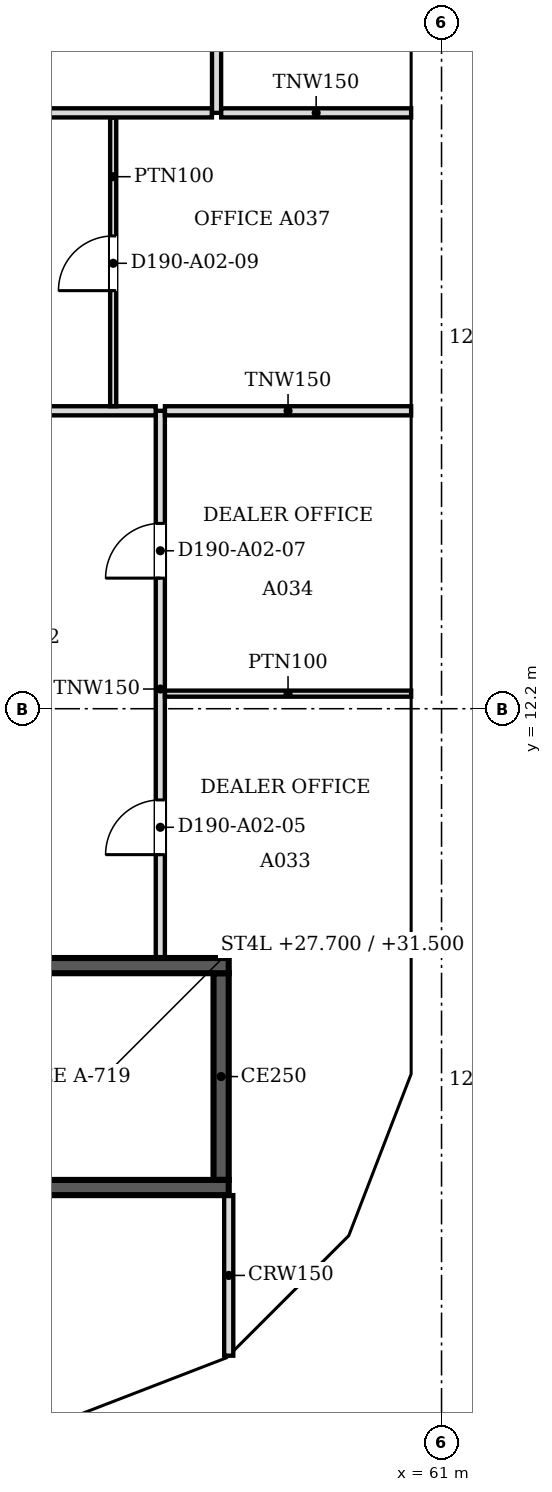
"""IFC4 building model, lengths in metres.
Left out: names, types, materials, properties, quantities, classifications, styles, units other than length and angle.
Written with IfcOpenShell. Run it as: python <this file> out.ifc"""

import sys

from ifc_helpers import new_model, si_unit, direction, frame, frame_2d, origin, place, context, subcontext, project, spatial, polyline, rectangle, outline, extrude, faceted_brep, source, transform, mapped, element, fill, save


model = new_model("IFC4")
c1 = context("Model", 3, precision=1e-05, world=origin(), true_north=direction((0.0, 1.0)))
c2 = subcontext(c1, "Body", "Model", "MODEL_VIEW")
j1 = project(units=[si_unit("LENGTHUNIT", "METRE"), si_unit("PLANEANGLEUNIT", "RADIAN")], contexts=[c1])
p1 = place(None, origin())
s1 = spatial("IfcSite", under=j1, at=p1, CompositionType="ELEMENT")
p2 = place(p1, origin())
s2 = spatial("IfcBuilding", under=s1, at=p2, CompositionType="ELEMENT")
p3 = place(p2, frame((0.0, 0.0, 25.8)))
s3 = spatial("IfcBuildingStorey", under=s2, at=p3, CompositionType="ELEMENT", Elevation=25.8)
m1 = source(origin(), c2, "Body", "Brep", [
    faceted_brep([(2.997, -0.25, 0.0), (0.047, -0.25, 3.8), (0.0, -0.25, 3.741), (0.0, -0.25, 0.0), (0.093, 0.25, 3.74), (2.944, 0.25, 0.068), (2.944, 0.25, 0.0), (0.093, 0.25, 0.0), (0.047, 0.0, 3.8), (2.997, 0.0, 0.0)], [[[0, 1, 2, 3]], [[4, 5, 6, 7]], [[5, 4, 8, 1, 0, 9]], [[2, 1, 8]], [[7, 6, 9, 0, 3]], [[7, 3, 2, 8, 4]], [[9, 6, 5]]]),
])
p4 = place(p3, frame((54.81, 0.233, 0.0), z_axis=(0.0, 0.0, 1.0), x_axis=(0.932990326376, 0.359901446078, 0.0)))
e1 = element("IfcWall", 1, at=p4, inside=s3, PredefinedType="SOLIDWALL", context=c2, shape_type="MappedRepresentation", body=[
    mapped(m1, transform((0.0, 0.0, 0.0), scale=1.0)),
])
m2 = source(origin(), c2, "Body", "SweptSolid", [
    extrude(outline(polyline([(2.487, 0.25), (0.247, 3.135), (0.247, 0.25), (2.487, 0.25)])), frame((0.0, 0.26, 0.0), z_axis=(0.0, -1.0, 0.0), x_axis=(1.0, 0.0, 0.0)), (0.0, 0.0, 1.0), 0.52),
])
p5 = place(p4, origin())
e2 = element("IfcOpeningElement", 2, at=p5, cuts=e1, PredefinedType="OPENING", context=c2, shape_type="MappedRepresentation", body=[
    mapped(m2, transform((0.0, 0.0, 0.0), scale=1.0)),
])
m3 = source(origin(), c2, "Body", "Brep", [
    faceted_brep([(2.997, -0.25, 3.732), (2.944, -0.25, 3.8), (0.0, -0.25, 0.0), (2.997, -0.25, 0.0), (0.053, 0.25, 0.068), (2.891, 0.25, 3.732), (2.891, 0.25, 0.0), (0.053, 0.25, 0.0), (2.944, 0.0, 3.8), (0.0, 0.0, 0.0)], [[[0, 1, 2, 3]], [[4, 5, 6, 7]], [[8, 1, 0]], [[5, 4, 9, 2, 1, 8]], [[7, 6, 3, 2, 9]], [[7, 9, 4]], [[3, 6, 5, 8, 0]]]),
])
p6 = place(p3, frame((57.606, 1.312, 0.0), z_axis=(0.0, 0.0, 1.0), x_axis=(0.707147509625, 0.707066050402, 0.0)))
e3 = element("IfcWall", 3, at=p6, inside=s3, PredefinedType="SOLIDWALL", context=c2, shape_type="MappedRepresentation", body=[
    mapped(m3, transform((0.0, 0.0, 0.0), scale=1.0)),
])
m4 = source(origin(), c2, "Body", "SweptSolid", [
    extrude(outline(polyline([(2.744, 3.134), (0.51, 0.25), (2.744, 0.25), (2.744, 3.134)])), frame((0.0, 0.26, 0.0), z_axis=(0.0, -1.0, 0.0), x_axis=(1.0, 0.0, 0.0)), (0.0, 0.0, 1.0), 0.52),
])
p7 = place(p6, origin())
e4 = element("IfcOpeningElement", 4, at=p7, cuts=e3, PredefinedType="OPENING", context=c2, shape_type="MappedRepresentation", body=[
    mapped(m4, transform((0.0, 0.0, 0.0), scale=1.0)),
])
m5 = source(origin(), c2, "Body", "Brep", [
    faceted_brep([(3.003, -0.25, 0.0), (0.053, -0.25, 3.8), (0.0, -0.25, 3.732), (0.0, -0.25, 0.0), (0.106, 0.25, 3.732), (2.957, 0.25, 0.06), (2.957, 0.25, 0.0), (0.106, 0.25, 0.0), (0.053, 0.0, 3.8), (3.003, 0.0, 0.0)], [[[0, 1, 2, 3]], [[4, 5, 6, 7]], [[5, 4, 8, 1, 0, 9]], [[2, 1, 8]], [[7, 6, 9, 0, 3]], [[7, 3, 2, 8, 4]], [[9, 6, 5]]]),
])
p8 = place(p3, frame((59.669, 3.344, 0.0), z_axis=(0.0, 0.0, 1.0), x_axis=(0.35992665181, 0.932980602862, 0.0)))
e5 = element("IfcWall", 5, at=p8, inside=s3, PredefinedType="SOLIDWALL", context=c2, shape_type="MappedRepresentation", body=[
    mapped(m5, transform((0.0, 0.0, 0.0), scale=1.0)),
])
m6 = source(origin(), c2, "Body", "SweptSolid", [
    extrude(outline(polyline([(2.493, 0.25), (0.253, 3.135), (0.253, 0.25), (2.493, 0.25)])), frame((0.0, 0.26, 0.0), z_axis=(0.0, -1.0, 0.0), x_axis=(1.0, 0.0, 0.0)), (0.0, 0.0, 1.0), 0.52),
])
p9 = place(p8, origin())
e6 = element("IfcOpeningElement", 6, at=p9, cuts=e5, PredefinedType="OPENING", context=c2, shape_type="MappedRepresentation", body=[
    mapped(m6, transform((0.0, 0.0, 0.0), scale=1.0)),
])
m7 = source(origin(), c2, "Body", "Brep", [
    faceted_brep([(6.053, -0.25, 0.0), (3.003, -0.25, 3.8), (0.0, -0.25, 0.0), (0.047, 0.25, 0.059), (3.003, 0.25, 3.8), (6.053, 0.25, 0.0), (0.047, 0.25, 0.0), (0.0, 0.0, 0.0)], [[[0, 1, 2]], [[3, 4, 5, 6]], [[5, 4, 1, 0]], [[4, 3, 7, 2, 1]], [[6, 5, 0, 2, 7]], [[6, 7, 3]]]),
])
p10 = place(p3, frame((60.75, 6.146, 0.0), z_axis=(0.0, 0.0, 1.0), x_axis=(0.0, 1.0, 0.0)))
e7 = element("IfcWall", 7, at=p10, inside=s3, PredefinedType="SOLIDWALL", context=c2, shape_type="MappedRepresentation", body=[
    mapped(m7, transform((0.0, 0.0, 0.0), scale=1.0)),
])
m8 = source(origin(), c2, "Body", "SweptSolid", [
    extrude(outline(polyline([(5.532, 0.25), (3.005, 3.399), (0.516, 0.25), (5.532, 0.25)])), frame((0.0, 0.26, 0.0), z_axis=(0.0, -1.0, 0.0), x_axis=(1.0, 0.0, 0.0)), (0.0, 0.0, 1.0), 0.52),
])
p11 = place(p10, origin())
e8 = element("IfcOpeningElement", 8, at=p11, cuts=e7, PredefinedType="OPENING", context=c2, shape_type="MappedRepresentation", body=[
    mapped(m8, transform((0.0, 0.0, 0.0), scale=1.0)),
])
m9 = source(origin(), c2, "Body", "SweptSolid", [
    extrude(outline(polyline([(6.1, 0.0), (3.05, 3.8), (0.0, 0.0), (6.1, 0.0)])), frame((0.0, 0.25, 0.0), z_axis=(0.0, -1.0, 0.0), x_axis=(1.0, 0.0, 0.0)), (0.0, 0.0, 1.0), 0.5),
])
p12 = place(p3, frame((60.75, 12.2, 0.0), z_axis=(0.0, 0.0, 1.0), x_axis=(0.0, 1.0, 0.0)))
e9 = element("IfcWall", 9, at=p12, inside=s3, PredefinedType="SOLIDWALL", context=c2, shape_type="MappedRepresentation", body=[
    mapped(m9, transform((0.0, 0.0, 0.0), scale=1.0)),
])
m10 = source(origin(), c2, "Body", "SweptSolid", [
    extrude(outline(polyline([(5.579, 0.25), (3.05, 3.401), (0.521, 0.25), (5.579, 0.25)])), frame((0.0, 0.26, 0.0), z_axis=(0.0, -1.0, 0.0), x_axis=(1.0, 0.0, 0.0)), (0.0, 0.0, 1.0), 0.52),
])
p13 = place(p12, origin())
e10 = element("IfcOpeningElement", 10, at=p13, cuts=e9, PredefinedType="OPENING", context=c2, shape_type="MappedRepresentation", body=[
    mapped(m10, transform((0.0, 0.0, 0.0), scale=1.0)),
])
m11 = source(origin(), c2, "Body", "Brep", [
    faceted_brep([(6.1, -0.25, 0.0), (3.05, -0.25, 3.8), (0.0, -0.25, 0.0), (6.1, -0.25, 0.0), (0.0, 0.25, 0.0), (3.05, 0.25, 3.8), (6.1, 0.25, 0.0), (6.1, 0.25, 0.0)], [[[0, 1, 2, 3]], [[4, 5, 6, 7]], [[6, 5, 1, 0]], [[5, 4, 2, 1]], [[4, 7, 3, 2]], [[3, 7, 6, 0]]]),
])
p14 = place(p3, frame((60.75, 18.3, 0.0), z_axis=(0.0, 0.0, 1.0), x_axis=(0.0, 1.0, 0.0)))
e11 = element("IfcWall", 11, at=p14, inside=s3, PredefinedType="SOLIDWALL", context=c2, shape_type="MappedRepresentation", body=[
    mapped(m11, transform((0.0, 0.0, 0.0), scale=1.0)),
])
p15 = place(p14, origin())
e12 = element("IfcOpeningElement", 12, at=p15, cuts=e11, PredefinedType="OPENING", context=c2, shape_type="MappedRepresentation", body=[
    mapped(m10, transform((0.0, 0.0, 0.0), scale=1.0)),
])
p16 = place(p2, frame((0.0, 0.0, 29.6)))
s4 = spatial("IfcBuildingStorey", under=s2, at=p16, CompositionType="ELEMENT", Elevation=29.6)
m12 = source(origin(), c2, "Body", "Brep", [
    faceted_brep([(2.95, -0.25, 0.0), (3.003, -0.25, 0.068), (3.003, -0.25, 7.531), (2.95, -0.25, 7.6), (0.0, -0.25, 3.8), (0.047, 0.25, 3.86), (2.898, 0.25, 7.532), (2.898, 0.25, 0.068), (0.047, 0.25, 3.74), (2.95, 0.0, 0.0), (2.95, 0.0, 7.6), (0.0, 0.0, 3.8)], [[[0, 1, 2, 3, 4]], [[5, 6, 7, 8]], [[1, 0, 9]], [[10, 3, 2]], [[6, 5, 11, 4, 3, 10]], [[8, 7, 9, 0, 4, 11]], [[8, 11, 5]], [[1, 9, 7, 6, 10, 2]]]),
])
p17 = place(p16, frame((54.854, 0.25, -3.8), z_axis=(0.0, 0.0, 1.0), x_axis=(0.932970071518, 0.359953949349, 0.0)))
e13 = element("IfcWall", 13, at=p17, inside=s4, PredefinedType="SOLIDWALL", context=c2, shape_type="MappedRepresentation", body=[
    mapped(m12, transform((0.0, 0.0, 0.0), scale=1.0)),
])
m13 = source(origin(), c2, "Body", "SweptSolid", [
    extrude(outline(polyline([(2.75, 6.935), (0.316, 3.8), (2.75, 0.665), (2.75, 6.935)])), frame((0.0, 0.26, 0.0), z_axis=(0.0, -1.0, 0.0), x_axis=(1.0, 0.0, 0.0)), (0.0, 0.0, 1.0), 0.52),
])
p18 = place(p17, origin())
e14 = element("IfcOpeningElement", 14, at=p18, cuts=e13, PredefinedType="OPENING", context=c2, shape_type="MappedRepresentation", body=[
    mapped(m13, transform((0.0, 0.0, 0.0), scale=1.0)),
])
m14 = source(origin(), c2, "Body", "Brep", [
    faceted_brep([(0.053, -0.25, 0.0), (2.997, -0.25, 3.8), (0.053, -0.25, 7.6), (0.0, -0.25, 7.532), (0.0, -0.25, 0.068), (0.106, 0.25, 7.531), (2.944, 0.25, 3.868), (2.944, 0.25, 3.732), (0.106, 0.25, 0.068), (2.997, 0.0, 3.8), (0.053, 0.0, 0.0), (0.053, 0.0, 7.6)], [[[0, 1, 2, 3, 4]], [[5, 6, 7, 8]], [[8, 7, 9, 1, 0, 10]], [[6, 5, 11, 2, 1, 9]], [[3, 2, 11]], [[10, 0, 4]], [[8, 10, 4, 3, 11, 5]], [[7, 6, 9]]]),
])
p19 = place(p16, frame((57.569, 1.274, -3.8), z_axis=(0.0, 0.0, 1.0), x_axis=(0.707066050402, 0.707147509625, 0.0)))
e15 = element("IfcWall", 15, at=p19, inside=s4, PredefinedType="SOLIDWALL", context=c2, shape_type="MappedRepresentation", body=[
    mapped(m14, transform((0.0, 0.0, 0.0), scale=1.0)),
])
m15 = source(origin(), c2, "Body", "SweptSolid", [
    extrude(outline(polyline([(0.253, 0.666), (2.681, 3.8), (0.253, 6.934), (0.253, 0.666)])), frame((0.0, 0.26, 0.0), z_axis=(0.0, -1.0, 0.0), x_axis=(1.0, 0.0, 0.0)), (0.0, 0.0, 1.0), 0.52),
])
p20 = place(p19, origin())
e16 = element("IfcOpeningElement", 16, at=p20, cuts=e15, PredefinedType="OPENING", context=c2, shape_type="MappedRepresentation", body=[
    mapped(m15, transform((0.0, 0.0, 0.0), scale=1.0)),
])
m16 = source(origin(), c2, "Body", "Brep", [
    faceted_brep([(2.95, -0.25, 0.0), (2.997, -0.25, 0.059), (2.997, -0.25, 7.541), (2.95, -0.25, 7.6), (0.0, -0.25, 3.8), (0.053, 0.25, 3.868), (2.904, 0.25, 7.54), (2.904, 0.25, 0.06), (0.053, 0.25, 3.732), (2.95, 0.0, 0.0), (2.95, 0.0, 7.6), (0.0, 0.0, 3.8)], [[[0, 1, 2, 3, 4]], [[5, 6, 7, 8]], [[1, 0, 9]], [[10, 3, 2]], [[6, 5, 11, 4, 3, 10]], [[8, 7, 9, 0, 4, 11]], [[8, 11, 5]], [[1, 9, 7, 6, 10, 2]]]),
])
p21 = place(p16, frame((59.688, 3.394, -3.8), z_axis=(0.0, 0.0, 1.0), x_axis=(0.359972353723, 0.932962970624, 0.0)))
e17 = element("IfcWall", 17, at=p21, inside=s4, PredefinedType="SOLIDWALL", context=c2, shape_type="MappedRepresentation", body=[
    mapped(m16, transform((0.0, 0.0, 0.0), scale=1.0)),
])
p22 = place(p21, origin())
e18 = element("IfcOpeningElement", 18, at=p22, cuts=e17, PredefinedType="OPENING", context=c2, shape_type="MappedRepresentation", body=[
    mapped(m13, transform((0.0, 0.0, 0.0), scale=1.0)),
])
m17 = source(origin(), c2, "Body", "Brep", [
    faceted_brep([(0.047, -0.25, 0.0), (3.05, -0.25, 3.8), (0.047, -0.25, 7.6), (0.0, -0.25, 7.54), (0.0, -0.25, 0.06), (0.093, 0.25, 7.541), (3.05, 0.25, 3.8), (0.093, 0.25, 0.059), (0.047, 0.0, 0.0), (0.047, 0.0, 7.6)], [[[0, 1, 2, 3, 4]], [[5, 6, 7]], [[7, 6, 1, 0, 8]], [[6, 5, 9, 2, 1]], [[3, 2, 9]], [[8, 0, 4]], [[7, 8, 4, 3, 9, 5]]]),
])
p23 = place(p16, frame((60.75, 6.1, -3.8), z_axis=(0.0, 0.0, 1.0), x_axis=(0.0, 1.0, 0.0)))
e19 = element("IfcWall", 19, at=p23, inside=s4, PredefinedType="SOLIDWALL", context=c2, shape_type="MappedRepresentation", body=[
    mapped(m17, transform((0.0, 0.0, 0.0), scale=1.0)),
])
m18 = source(origin(), c2, "Body", "SweptSolid", [
    extrude(outline(polyline([(0.247, 0.656), (2.731, 3.8), (0.247, 6.944), (0.247, 0.656)])), frame((0.0, 0.26, 0.0), z_axis=(0.0, -1.0, 0.0), x_axis=(1.0, 0.0, 0.0)), (0.0, 0.0, 1.0), 0.52),
])
p24 = place(p23, origin())
e20 = element("IfcOpeningElement", 20, at=p24, cuts=e19, PredefinedType="OPENING", context=c2, shape_type="MappedRepresentation", body=[
    mapped(m18, transform((0.0, 0.0, 0.0), scale=1.0)),
])
m19 = source(origin(), c2, "Body", "SweptSolid", [
    extrude(outline(polyline([(3.05, 0.0), (6.1, 3.8), (3.05, 7.6), (0.0, 3.8), (3.05, 0.0)])), frame((0.0, 0.25, 0.0), z_axis=(0.0, -1.0, 0.0), x_axis=(1.0, 0.0, 0.0)), (0.0, 0.0, 1.0), 0.5),
])
p25 = place(p16, frame((60.75, 9.15, -3.8), z_axis=(0.0, 0.0, 1.0), x_axis=(0.0, 1.0, 0.0)))
e21 = element("IfcWall", 21, at=p25, inside=s4, PredefinedType="SOLIDWALL", context=c2, shape_type="MappedRepresentation", body=[
    mapped(m19, transform((0.0, 0.0, 0.0), scale=1.0)),
])
m20 = source(origin(), c2, "Body", "SweptSolid", [
    extrude(outline(polyline([(3.05, 0.399), (5.78, 3.8), (3.05, 7.2), (0.321, 3.8), (3.05, 0.399)])), frame((0.0, 0.26, 0.0), z_axis=(0.0, -1.0, 0.0), x_axis=(1.0, 0.0, 0.0)), (0.0, 0.0, 1.0), 0.52),
])
p26 = place(p25, origin())
e22 = element("IfcOpeningElement", 22, at=p26, cuts=e21, PredefinedType="OPENING", context=c2, shape_type="MappedRepresentation", body=[
    mapped(m20, transform((0.0, 0.0, 0.0), scale=1.0)),
])
p27 = place(p16, frame((60.75, 15.25, -3.8), z_axis=(0.0, 0.0, 1.0), x_axis=(0.0, 1.0, 0.0)))
e23 = element("IfcWall", 23, at=p27, inside=s4, PredefinedType="SOLIDWALL", context=c2, shape_type="MappedRepresentation", body=[
    mapped(m19, transform((0.0, 0.0, 0.0), scale=1.0)),
])
p28 = place(p27, origin())
e24 = element("IfcOpeningElement", 24, at=p28, cuts=e23, PredefinedType="OPENING", context=c2, shape_type="MappedRepresentation", body=[
    mapped(m20, transform((0.0, 0.0, 0.0), scale=1.0)),
])
m21 = source(origin(), c2, "Body", "Brep", [
    faceted_brep([(3.05, -0.25, 0.0), (6.1, -0.25, 3.8), (6.1, -0.25, 3.8), (3.05, -0.25, 7.6), (0.0, -0.25, 3.8), (0.0, 0.25, 3.8), (3.05, 0.25, 7.6), (6.1, 0.25, 3.8), (6.1, 0.25, 3.8), (3.05, 0.25, 0.0)], [[[0, 1, 2, 3, 4]], [[5, 6, 7, 8, 9]], [[9, 8, 1, 0]], [[7, 6, 3, 2]], [[6, 5, 4, 3]], [[5, 9, 0, 4]], [[1, 8, 7, 2]]]),
])
p29 = place(p16, frame((60.75, 21.35, -3.8), z_axis=(0.0, 0.0, 1.0), x_axis=(0.0, 1.0, 0.0)))
e25 = element("IfcWall", 25, at=p29, inside=s4, PredefinedType="SOLIDWALL", context=c2, shape_type="MappedRepresentation", body=[
    mapped(m21, transform((0.0, 0.0, 0.0), scale=1.0)),
])
p30 = place(p29, origin())
e26 = element("IfcOpeningElement", 26, at=p30, cuts=e25, PredefinedType="OPENING", context=c2, shape_type="MappedRepresentation", body=[
    mapped(m20, transform((0.0, 0.0, 0.0), scale=1.0)),
])
p31 = place(p3, frame((57.5, 4.325, 0.0), z_axis=(0.0, 0.0, 1.0), x_axis=(-1.0, 0.0, 0.0)))
e27 = element("IfcWall", 27, at=p31, inside=s3, PredefinedType="SOLIDWALL", context=c2, shape_type="SweptSolid", body=[
    extrude(rectangle(XDim=8.5, YDim=0.25, at=frame_2d((4.25, 0.0))), origin(), (0.0, 0.0, 1.0), 3.8),
])
m22 = source(origin(), c2, "Body", "SweptSolid", [
    extrude(rectangle(XDim=1.2, YDim=2.1, at=frame_2d((0.6, 1.05))), frame((0.0, 0.135, 0.0), z_axis=(0.0, -1.0, 0.0), x_axis=(1.0, 0.0, 0.0)), (0.0, 0.0, 1.0), 0.27),
])
p32 = place(p31, frame((6.9, 0.0, 0.0)))
e28 = element("IfcOpeningElement", 28, at=p32, cuts=e27, PredefinedType="OPENING", context=c2, shape_type="MappedRepresentation", body=[
    mapped(m22, transform((0.0, 0.0, 0.0), scale=1.0)),
])
p33 = place(p3, frame((49.0, 7.975, 0.0), z_axis=(0.0, 0.0, 1.0), x_axis=(1.0, 0.0, 0.0)))
e29 = element("IfcWall", 29, at=p33, inside=s3, PredefinedType="SOLIDWALL", context=c2, shape_type="SweptSolid", body=[
    extrude(rectangle(XDim=8.5, YDim=0.25, at=frame_2d((4.25, 0.0))), origin(), (0.0, 0.0, 1.0), 3.8),
])
p34 = place(p3, frame((57.375, 7.85, 0.0), z_axis=(0.0, 0.0, 1.0), x_axis=(0.0, -1.0, 0.0)))
e30 = element("IfcWall", 30, at=p34, inside=s3, PredefinedType="SOLIDWALL", context=c2, shape_type="SweptSolid", body=[
    extrude(rectangle(XDim=3.4, YDim=0.25, at=frame_2d((1.7, 0.0))), origin(), (0.0, 0.0, 1.0), 3.8),
])
p35 = place(p3, frame((57.5, 1.559, 0.0), z_axis=(0.0, 0.0, 1.0), x_axis=(0.0, 1.0, 0.0)))
e31 = element("IfcWall", 31, at=p35, inside=s3, PredefinedType="PARTITIONING", context=c2, shape_type="SweptSolid", body=[
    extrude(rectangle(XDim=2.641, YDim=0.15, at=frame_2d((1.32, 0.0))), origin(), (0.0, 0.0, 1.0), 3.067),
])
p36 = place(p3, frame((56.375, 17.1, 0.0), z_axis=(0.0, 0.0, 1.0), x_axis=(0.0, -1.0, 0.0)))
e32 = element("IfcWall", 32, at=p36, inside=s3, PredefinedType="PARTITIONING", context=c2, shape_type="SweptSolid", body=[
    extrude(rectangle(XDim=9.0, YDim=0.15, at=frame_2d((4.5, 0.0))), origin(), (0.0, 0.0, 1.0), 3.067),
])
m23 = source(origin(), c2, "Body", "SweptSolid", [
    extrude(rectangle(XDim=0.9, YDim=2.1, at=frame_2d((0.45, 1.05))), frame((0.0, 0.085, 0.0), z_axis=(0.0, -1.0, 0.0), x_axis=(1.0, 0.0, 0.0)), (0.0, 0.0, 1.0), 0.17),
])
p37 = place(p36, frame((6.4, 0.0, 0.0)))
e33 = element("IfcOpeningElement", 33, at=p37, cuts=e32, PredefinedType="OPENING", context=c2, shape_type="MappedRepresentation", body=[
    mapped(m23, transform((0.0, 0.0, 0.0), scale=1.0)),
])
p38 = place(p36, frame((1.852, 0.0, 0.0)))
e34 = element("IfcOpeningElement", 34, at=p38, cuts=e32, PredefinedType="OPENING", context=c2, shape_type="MappedRepresentation", body=[
    mapped(m23, transform((0.0, 0.0, 0.0), scale=1.0)),
])
p39 = place(p3, frame((56.451, 12.448, 0.0), z_axis=(0.0, 0.0, 1.0), x_axis=(1.0, 0.0, 0.0)))
e35 = element("IfcWall", 35, at=p39, inside=s3, PredefinedType="PARTITIONING", context=c2, shape_type="SweptSolid", body=[
    extrude(rectangle(XDim=4.049, YDim=0.1, at=frame_2d((2.024, 0.0))), origin(), (0.0, 0.0, 1.0), 3.067),
])
p40 = place(p3, frame((45.476, 17.1, 0.0), z_axis=(0.0, 0.0, 1.0), x_axis=(1.0, 0.0, 0.0)))
e36 = element("IfcWall", 36, at=p40, inside=s3, PredefinedType="PARTITIONING", context=c2, shape_type="SweptSolid", body=[
    extrude(rectangle(XDim=10.823, YDim=0.15, at=frame_2d((5.412, 0.0))), origin(), (0.0, 0.0, 1.0), 3.067),
])
p41 = place(p3, frame((56.451, 17.1, 0.0), z_axis=(0.0, 0.0, 1.0), x_axis=(1.0, 0.0, 0.0)))
e37 = element("IfcWall", 37, at=p41, inside=s3, PredefinedType="PARTITIONING", context=c2, shape_type="SweptSolid", body=[
    extrude(rectangle(XDim=4.049, YDim=0.15, at=frame_2d((2.024, 0.0))), origin(), (0.0, 0.0, 1.0), 3.067),
])
p42 = place(p3, frame((55.6, 21.924, 0.0), z_axis=(0.0, 0.0, 1.0), x_axis=(0.0, -1.0, 0.0)))
e38 = element("IfcWall", 38, at=p42, inside=s3, PredefinedType="PARTITIONING", context=c2, shape_type="SweptSolid", body=[
    extrude(rectangle(XDim=4.748, YDim=0.1, at=frame_2d((2.374, 0.0))), origin(), (0.0, 0.0, 1.0), 3.067),
])
m24 = source(origin(), c2, "Body", "SweptSolid", [
    extrude(rectangle(XDim=0.9, YDim=2.1, at=frame_2d((0.45, 1.05))), frame((0.0, 0.06, 0.0), z_axis=(0.0, -1.0, 0.0), x_axis=(1.0, 0.0, 0.0)), (0.0, 0.0, 1.0), 0.12),
])
p43 = place(p42, frame((1.948, 0.0, 0.0)))
e39 = element("IfcOpeningElement", 39, at=p43, cuts=e38, PredefinedType="OPENING", context=c2, shape_type="MappedRepresentation", body=[
    mapped(m24, transform((0.0, 0.0, 0.0), scale=1.0)),
])
p44 = place(p3, frame((45.476, 22.0, 0.0), z_axis=(0.0, 0.0, 1.0), x_axis=(1.0, 0.0, 0.0)))
e40 = element("IfcWall", 40, at=p44, inside=s3, PredefinedType="PARTITIONING", context=c2, shape_type="SweptSolid", body=[
    extrude(rectangle(XDim=11.748, YDim=0.15, at=frame_2d((5.874, 0.0))), origin(), (0.0, 0.0, 1.0), 3.067),
])
p45 = place(p3, frame((57.3, 30.6, 0.0), z_axis=(0.0, 0.0, 1.0), x_axis=(0.0, -1.0, 0.0)))
e41 = element("IfcWall", 41, at=p45, inside=s3, PredefinedType="PARTITIONING", context=c2, shape_type="SweptSolid", body=[
    extrude(rectangle(XDim=8.6, YDim=0.15, at=frame_2d((4.3, 0.0))), origin(), (0.0, 0.0, 1.0), 3.067),
])
p46 = place(p45, frame((3.9, 0.0, 0.0)))
e42 = element("IfcOpeningElement", 42, at=p46, cuts=e41, PredefinedType="OPENING", context=c2, shape_type="MappedRepresentation", body=[
    mapped(m23, transform((0.0, 0.0, 0.0), scale=1.0)),
])
p47 = place(p3, frame((57.376, 22.0, 0.0), z_axis=(0.0, 0.0, 1.0), x_axis=(1.0, 0.0, 0.0)))
e43 = element("IfcWall", 43, at=p47, inside=s3, PredefinedType="PARTITIONING", context=c2, shape_type="SweptSolid", body=[
    extrude(rectangle(XDim=3.124, YDim=0.15, at=frame_2d((1.562, 0.0))), origin(), (0.0, 0.0, 1.0), 3.067),
])
m25 = source(origin(), c2, "Body", "SweptSolid", [
    extrude(rectangle(XDim=0.9, YDim=2.1, at=frame_2d((0.45, 1.05))), frame((0.0, 0.025, 0.0), z_axis=(0.0, -1.0, 0.0), x_axis=(1.0, 0.0, 0.0)), (0.0, 0.0, 1.0), 0.05),
])
p48 = place(p37, origin())
e44 = element("IfcDoor", 44, at=p48, inside=s3, OperationType="SINGLE_SWING_RIGHT", PredefinedType="DOOR", context=c2, shape_type="MappedRepresentation", body=[
    mapped(m25, transform((0.0, 0.0, 0.0), scale=1.0)),
])
fill(e33, e44)
p49 = place(p38, origin())
e45 = element("IfcDoor", 45, at=p49, inside=s3, OperationType="SINGLE_SWING_RIGHT", PredefinedType="DOOR", context=c2, shape_type="MappedRepresentation", body=[
    mapped(m25, transform((0.0, 0.0, 0.0), scale=1.0)),
])
fill(e34, e45)
p50 = place(p43, origin())
e46 = element("IfcDoor", 46, at=p50, inside=s3, OperationType="SINGLE_SWING_RIGHT", PredefinedType="DOOR", context=c2, shape_type="MappedRepresentation", body=[
    mapped(m25, transform((0.0, 0.0, 0.0), scale=1.0)),
])
fill(e39, e46)
save(model, sys.argv[1])
